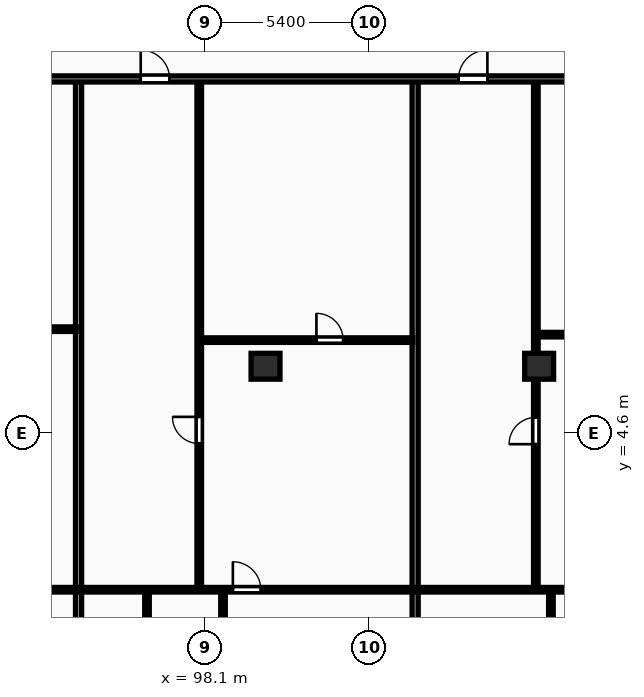
"""IFC4 building model, lengths in metres.
Left out: names, types, materials, properties, quantities, classifications, styles, units other than length and angle.
Written with IfcOpenShell. Run it as: python <this file> out.ifc"""

import sys

from ifc_helpers import new_model, si_unit, direction, frame, frame_2d, origin, origin_2d, place, context, subcontext, project, spatial, rectangle, extrude, element, fill, save


model = new_model("IFC4")
c1 = context("Model", 3, precision=1e-05, world=origin(), true_north=direction((0.0, 1.0)))
c2 = subcontext(c1, "Body", "Model", "MODEL_VIEW")
j1 = project(units=[si_unit("LENGTHUNIT", "METRE"), si_unit("PLANEANGLEUNIT", "RADIAN")], contexts=[c1])
p1 = place(None, origin())
s1 = spatial("IfcSite", under=j1, at=p1, CompositionType="ELEMENT")
p2 = place(p1, origin())
s2 = spatial("IfcBuilding", under=s1, at=p2, CompositionType="ELEMENT")
p3 = place(p2, frame((0.0, 0.0, 24.0)))
s3 = spatial("IfcBuildingStorey", under=s2, at=p3, CompositionType="ELEMENT", Elevation=24.0)
for number, where, z_axis, x_axis in (
    (1, (100.1, 6.8, 0.0), (0.0, 0.0, 1.0), (1.0, 0.0, 0.0)),
    (2, (109.1, 6.8, 0.0), (0.0, 0.0, 1.0), (1.0, 0.0, 0.0)),
):
    element("IfcColumn", number, at=place(p3, frame(where, z_axis=z_axis, x_axis=x_axis)), inside=s3, PredefinedType="COLUMN", context=c2, shape_type="SweptSolid", body=[
        extrude(rectangle(XDim=0.95, YDim=0.85, at=origin_2d()), origin(), (0.0, 0.0, 1.0), 3.25),
    ])
p4 = place(p3, frame((93.95, -10.9, 0.0), z_axis=(0.0, 0.0, 1.0), x_axis=(0.0, 1.0, 0.0)))
e3 = element("IfcWall", 3, at=p4, inside=s3, PredefinedType="PARTITIONING", context=c2, shape_type="SweptSolid", body=[
    extrude(rectangle(XDim=27.07, YDim=0.2, at=frame_2d((13.535, 0.0))), origin(), (0.0, 0.0, 1.0), 2.97),
])
p5 = place(p3, frame((85.802, 8.02, 0.0), z_axis=(0.0, 0.0, 1.0), x_axis=(1.0, 0.0, 0.0)))
e4 = element("IfcWall", 4, at=p5, inside=s3, PredefinedType="PARTITIONING", context=c2, shape_type="SweptSolid", body=[
    extrude(rectangle(XDim=8.069, YDim=0.15, at=frame_2d((4.034, 0.0))), origin(), (0.0, 0.0, 1.0), 2.97),
])
p6 = place(p5, frame((2.716, 0.0, 0.0)))
e5 = element("IfcOpeningElement", 5, at=p6, cuts=e4, PredefinedType="OPENING", context=c2, shape_type="SweptSolid", body=[
    extrude(rectangle(XDim=0.88, YDim=2.06, at=frame_2d((0.44, 1.03))), frame((0.0, 0.085, 0.0), z_axis=(0.0, -1.0, 0.0), x_axis=(1.0, 0.0, 0.0)), (0.0, 0.0, 1.0), 0.17),
])
p7 = place(p3, frame((81.851, -0.55, 0.0), z_axis=(0.0, 0.0, 1.0), x_axis=(1.0, 0.0, 0.0)))
e6 = element("IfcWall", 6, at=p7, inside=s3, PredefinedType="PARTITIONING", context=c2, shape_type="SweptSolid", body=[
    extrude(rectangle(XDim=12.019, YDim=0.15, at=frame_2d((6.009, 0.0))), origin(), (0.0, 0.0, 1.0), 2.97),
])
p8 = place(p7, frame((5.999, 0.0, 0.0)))
e7 = element("IfcOpeningElement", 7, at=p8, cuts=e6, PredefinedType="OPENING", context=c2, shape_type="SweptSolid", body=[
    extrude(rectangle(XDim=0.92, YDim=2.08, at=frame_2d((0.46, 1.04))), frame((0.0, 0.085, 0.0), z_axis=(0.0, -1.0, 0.0), x_axis=(1.0, 0.0, 0.0)), (0.0, 0.0, 1.0), 0.17),
])
p9 = place(p3, frame((105.021, -10.9, 0.0), z_axis=(0.0, 0.0, 1.0), x_axis=(0.0, 1.0, 0.0)))
e8 = element("IfcWall", 8, at=p9, inside=s3, PredefinedType="PARTITIONING", context=c2, shape_type="SweptSolid", body=[
    extrude(rectangle(XDim=27.07, YDim=0.2, at=frame_2d((13.535, 0.0))), origin(), (0.0, 0.0, 1.0), 2.97),
])
p10 = place(p3, frame((97.98, 7.66, 0.0), z_axis=(0.0, 0.0, 1.0), x_axis=(1.0, 0.0, 0.0)))
e9 = element("IfcWall", 9, at=p10, inside=s3, PredefinedType="PARTITIONING", context=c2, shape_type="SweptSolid", body=[
    extrude(rectangle(XDim=6.961, YDim=0.15, at=frame_2d((3.481, 0.0))), origin(), (0.0, 0.0, 1.0), 2.97),
])
p11 = place(p10, frame((3.794, 0.0, 0.0)))
e10 = element("IfcOpeningElement", 10, at=p11, cuts=e9, PredefinedType="OPENING", context=c2, shape_type="SweptSolid", body=[
    extrude(rectangle(XDim=0.88, YDim=2.06, at=frame_2d((0.44, 1.03))), frame((0.0, 0.085, 0.0), z_axis=(0.0, -1.0, 0.0), x_axis=(1.0, 0.0, 0.0)), (0.0, 0.0, 1.0), 0.17),
])
p12 = place(p3, frame((97.92, -0.51, 0.0), z_axis=(0.0, 0.0, 1.0), x_axis=(0.0, 1.0, 0.0)))
e11 = element("IfcWall", 11, at=p12, inside=s3, PredefinedType="PARTITIONING", context=c2, shape_type="SweptSolid", body=[
    extrude(rectangle(XDim=16.7, YDim=0.15, at=frame_2d((8.35, 0.0))), origin(), (0.0, 0.0, 1.0), 2.97),
])
p13 = place(p12, frame((4.765, 0.0, 0.0)))
e12 = element("IfcOpeningElement", 12, at=p13, cuts=e11, PredefinedType="OPENING", context=c2, shape_type="SweptSolid", body=[
    extrude(rectangle(XDim=0.88, YDim=2.06, at=frame_2d((0.44, 1.03))), frame((0.0, 0.085, 0.0), z_axis=(0.0, -1.0, 0.0), x_axis=(1.0, 0.0, 0.0)), (0.0, 0.0, 1.0), 0.17),
])
p14 = place(p3, frame((96.201, -5.59, 0.0), z_axis=(0.0, 0.0, 1.0), x_axis=(0.0, 1.0, 0.0)))
e13 = element("IfcWall", 13, at=p14, inside=s3, PredefinedType="PARTITIONING", context=c2, shape_type="SweptSolid", body=[
    extrude(rectangle(XDim=5.0, YDim=0.15, at=frame_2d((2.5, 0.0))), origin(), (0.0, 0.0, 1.0), 2.97),
])
p15 = place(p14, frame((2.08, 0.0, 0.0)))
e14 = element("IfcOpeningElement", 14, at=p15, cuts=e13, PredefinedType="OPENING", context=c2, shape_type="SweptSolid", body=[
    extrude(rectangle(XDim=0.84, YDim=2.04, at=frame_2d((0.42, 1.02))), frame((0.0, 0.085, 0.0), z_axis=(0.0, -1.0, 0.0), x_axis=(1.0, 0.0, 0.0)), (0.0, 0.0, 1.0), 0.17),
])
p16 = place(p3, frame((98.701, -5.59, 0.0), z_axis=(0.0, 0.0, 1.0), x_axis=(0.0, 1.0, 0.0)))
e15 = element("IfcWall", 15, at=p16, inside=s3, PredefinedType="PARTITIONING", context=c2, shape_type="SweptSolid", body=[
    extrude(rectangle(XDim=5.0, YDim=0.15, at=frame_2d((2.5, 0.0))), origin(), (0.0, 0.0, 1.0), 2.97),
])
p17 = place(p16, frame((3.088, 0.0, 0.0)))
e16 = element("IfcOpeningElement", 16, at=p17, cuts=e15, PredefinedType="OPENING", context=c2, shape_type="SweptSolid", body=[
    extrude(rectangle(XDim=0.84, YDim=2.04, at=frame_2d((0.42, 1.02))), frame((0.0, 0.085, 0.0), z_axis=(0.0, -1.0, 0.0), x_axis=(1.0, 0.0, 0.0)), (0.0, 0.0, 1.0), 0.17),
])
p18 = place(p3, frame((94.03, -0.55, 0.0), z_axis=(0.0, 0.0, 1.0), x_axis=(1.0, 0.0, 0.0)))
e17 = element("IfcWall", 17, at=p18, inside=s3, PredefinedType="PARTITIONING", context=c2, shape_type="SweptSolid", body=[
    extrude(rectangle(XDim=10.911, YDim=0.15, at=frame_2d((5.456, 0.0))), origin(), (0.0, 0.0, 1.0), 2.97),
])
p19 = place(p18, frame((4.996, 0.0, 0.0)))
e18 = element("IfcOpeningElement", 18, at=p19, cuts=e17, PredefinedType="OPENING", context=c2, shape_type="SweptSolid", body=[
    extrude(rectangle(XDim=0.92, YDim=2.08, at=frame_2d((0.46, 1.04))), frame((0.0, 0.085, 0.0), z_axis=(0.0, -1.0, 0.0), x_axis=(1.0, 0.0, 0.0)), (0.0, 0.0, 1.0), 0.17),
])
p20 = place(p3, frame((109.052, 7.84, 0.0), z_axis=(0.0, 0.0, 1.0), x_axis=(1.0, 0.0, 0.0)))
e19 = element("IfcWall", 19, at=p20, inside=s3, PredefinedType="PARTITIONING", context=c2, shape_type="SweptSolid", body=[
    extrude(rectangle(XDim=9.176, YDim=0.15, at=frame_2d((4.588, 0.0))), origin(), (0.0, 0.0, 1.0), 2.97),
])
p21 = place(p20, frame((3.307, 0.0, 0.0)))
e20 = element("IfcOpeningElement", 20, at=p21, cuts=e19, PredefinedType="OPENING", context=c2, shape_type="SweptSolid", body=[
    extrude(rectangle(XDim=0.88, YDim=2.06, at=frame_2d((0.44, 1.03))), frame((0.0, 0.085, 0.0), z_axis=(0.0, -1.0, 0.0), x_axis=(1.0, 0.0, 0.0)), (0.0, 0.0, 1.0), 0.17),
])
p22 = place(p3, frame((108.991, -0.51, 0.0), z_axis=(0.0, 0.0, 1.0), x_axis=(0.0, 1.0, 0.0)))
e21 = element("IfcWall", 21, at=p22, inside=s3, PredefinedType="PARTITIONING", context=c2, shape_type="SweptSolid", body=[
    extrude(rectangle(XDim=16.7, YDim=0.15, at=frame_2d((8.35, 0.0))), origin(), (0.0, 0.0, 1.0), 2.22),
])
p23 = place(p22, frame((4.747, 0.0, 0.0)))
e22 = element("IfcOpeningElement", 22, at=p23, cuts=e21, PredefinedType="OPENING", context=c2, shape_type="SweptSolid", body=[
    extrude(rectangle(XDim=0.88, YDim=2.06, at=frame_2d((0.44, 1.03))), frame((0.0, 0.085, 0.0), z_axis=(0.0, -1.0, 0.0), x_axis=(1.0, 0.0, 0.0)), (0.0, 0.0, 1.0), 0.17),
])
p24 = place(p3, frame((109.487, -5.59, 0.0), z_axis=(0.0, 0.0, 1.0), x_axis=(0.0, 1.0, 0.0)))
e23 = element("IfcWall", 23, at=p24, inside=s3, PredefinedType="PARTITIONING", context=c2, shape_type="SweptSolid", body=[
    extrude(rectangle(XDim=5.0, YDim=0.15, at=frame_2d((2.5, 0.0))), origin(), (0.0, 0.0, 1.0), 2.22),
])
p25 = place(p24, frame((3.049, 0.0, 0.0)))
e24 = element("IfcOpeningElement", 24, at=p25, cuts=e23, PredefinedType="OPENING", context=c2, shape_type="SweptSolid", body=[
    extrude(rectangle(XDim=0.84, YDim=2.04, at=frame_2d((0.42, 1.02))), frame((0.0, 0.085, 0.0), z_axis=(0.0, -1.0, 0.0), x_axis=(1.0, 0.0, 0.0)), (0.0, 0.0, 1.0), 0.17),
])
p26 = place(p3, frame((105.101, -0.55, 0.0), z_axis=(0.0, 0.0, 1.0), x_axis=(1.0, 0.0, 0.0)))
e25 = element("IfcWall", 25, at=p26, inside=s3, PredefinedType="PARTITIONING", context=c2, shape_type="SweptSolid", body=[
    extrude(rectangle(XDim=13.126, YDim=0.15, at=frame_2d((6.563, 0.0))), origin(), (0.0, 0.0, 1.0), 2.97),
])
p27 = place(p26, frame((7.106, 0.0, 0.0)))
e26 = element("IfcOpeningElement", 26, at=p27, cuts=e25, PredefinedType="OPENING", context=c2, shape_type="SweptSolid", body=[
    extrude(rectangle(XDim=0.92, YDim=2.08, at=frame_2d((0.46, 1.04))), frame((0.0, 0.085, 0.0), z_axis=(0.0, -1.0, 0.0), x_axis=(1.0, 0.0, 0.0)), (0.0, 0.0, 1.0), 0.17),
])
p28 = place(p3, frame((70.7, 16.25, 0.0), z_axis=(0.0, 0.0, 1.0), x_axis=(1.0, 0.0, 0.0)))
e27 = element("IfcWall", 27, at=p28, inside=s3, PredefinedType="PARTITIONING", context=c2, shape_type="SweptSolid", body=[
    extrude(rectangle(XDim=62.0, YDim=0.2, at=frame_2d((31.0, 0.0))), origin(), (0.0, 0.0, 1.0), 2.97),
])
p29 = place(p28, frame((1.186, 0.0, 0.0)))
e28 = element("IfcOpeningElement", 28, at=p29, cuts=e27, PredefinedType="OPENING", context=c2, shape_type="SweptSolid", body=[
    extrude(rectangle(XDim=0.95, YDim=2.15, at=frame_2d((0.475, 1.075))), frame((0.0, 0.11, 0.0), z_axis=(0.0, -1.0, 0.0), x_axis=(1.0, 0.0, 0.0)), (0.0, 0.0, 1.0), 0.22),
])
p30 = place(p28, frame((13.116, 0.0, 0.0)))
e29 = element("IfcOpeningElement", 29, at=p30, cuts=e27, PredefinedType="OPENING", context=c2, shape_type="SweptSolid", body=[
    extrude(rectangle(XDim=0.95, YDim=2.15, at=frame_2d((0.475, 1.075))), frame((0.0, 0.11, 0.0), z_axis=(0.0, -1.0, 0.0), x_axis=(1.0, 0.0, 0.0)), (0.0, 0.0, 1.0), 0.22),
])
p31 = place(p28, frame((25.295, 0.0, 0.0)))
e30 = element("IfcOpeningElement", 30, at=p31, cuts=e27, PredefinedType="OPENING", context=c2, shape_type="SweptSolid", body=[
    extrude(rectangle(XDim=0.95, YDim=2.15, at=frame_2d((0.475, 1.075))), frame((0.0, 0.11, 0.0), z_axis=(0.0, -1.0, 0.0), x_axis=(1.0, 0.0, 0.0)), (0.0, 0.0, 1.0), 0.22),
])
p32 = place(p28, frame((35.747, 0.0, 0.0)))
e31 = element("IfcOpeningElement", 31, at=p32, cuts=e27, PredefinedType="OPENING", context=c2, shape_type="SweptSolid", body=[
    extrude(rectangle(XDim=0.95, YDim=2.15, at=frame_2d((0.475, 1.075))), frame((0.0, 0.11, 0.0), z_axis=(0.0, -1.0, 0.0), x_axis=(1.0, 0.0, 0.0)), (0.0, 0.0, 1.0), 0.22),
])
p33 = place(p28, frame((49.652, 0.0, 0.0)))
e32 = element("IfcOpeningElement", 32, at=p33, cuts=e27, PredefinedType="OPENING", context=c2, shape_type="SweptSolid", body=[
    extrude(rectangle(XDim=0.95, YDim=2.15, at=frame_2d((0.475, 1.075))), frame((0.0, 0.11, 0.0), z_axis=(0.0, -1.0, 0.0), x_axis=(1.0, 0.0, 0.0)), (0.0, 0.0, 1.0), 0.22),
])
p34 = place(p11, origin())
e33 = element("IfcDoor", 33, at=p34, inside=s3, OperationType="SINGLE_SWING_LEFT", PredefinedType="DOOR", context=c2, shape_type="SweptSolid", body=[
    extrude(rectangle(XDim=0.88, YDim=2.06, at=frame_2d((0.44, 1.03))), frame((0.0, 0.025, 0.0), z_axis=(0.0, -1.0, 0.0), x_axis=(1.0, 0.0, 0.0)), (0.0, 0.0, 1.0), 0.05),
])
fill(e10, e33)
p35 = place(p13, origin())
e34 = element("IfcDoor", 34, at=p35, inside=s3, OperationType="SINGLE_SWING_RIGHT", PredefinedType="DOOR", context=c2, shape_type="SweptSolid", body=[
    extrude(rectangle(XDim=0.88, YDim=2.06, at=frame_2d((0.44, 1.03))), frame((0.0, 0.025, 0.0), z_axis=(0.0, -1.0, 0.0), x_axis=(1.0, 0.0, 0.0)), (0.0, 0.0, 1.0), 0.05),
])
fill(e12, e34)
p36 = place(p19, origin())
e35 = element("IfcDoor", 35, at=p36, inside=s3, OperationType="SINGLE_SWING_LEFT", PredefinedType="DOOR", context=c2, shape_type="SweptSolid", body=[
    extrude(rectangle(XDim=0.92, YDim=2.08, at=frame_2d((0.46, 1.04))), frame((0.0, 0.025, 0.0), z_axis=(0.0, -1.0, 0.0), x_axis=(1.0, 0.0, 0.0)), (0.0, 0.0, 1.0), 0.05),
])
fill(e18, e35)
p37 = place(p23, origin())
e36 = element("IfcDoor", 36, at=p37, inside=s3, OperationType="SINGLE_SWING_LEFT", PredefinedType="DOOR", context=c2, shape_type="SweptSolid", body=[
    extrude(rectangle(XDim=0.88, YDim=2.06, at=frame_2d((0.44, 1.03))), frame((0.0, 0.025, 0.0), z_axis=(0.0, -1.0, 0.0), x_axis=(1.0, 0.0, 0.0)), (0.0, 0.0, 1.0), 0.05),
])
fill(e22, e36)
p38 = place(p31, origin())
e37 = element("IfcDoor", 37, at=p38, inside=s3, OperationType="SINGLE_SWING_LEFT", PredefinedType="DOOR", context=c2, shape_type="SweptSolid", body=[
    extrude(rectangle(XDim=0.95, YDim=2.15, at=frame_2d((0.475, 1.075))), frame((0.0, 0.025, 0.0), z_axis=(0.0, -1.0, 0.0), x_axis=(1.0, 0.0, 0.0)), (0.0, 0.0, 1.0), 0.05),
])
fill(e30, e37)
p39 = place(p32, origin())
e38 = element("IfcDoor", 38, at=p39, inside=s3, OperationType="SINGLE_SWING_RIGHT", PredefinedType="DOOR", context=c2, shape_type="SweptSolid", body=[
    extrude(rectangle(XDim=0.95, YDim=2.15, at=frame_2d((0.475, 1.075))), frame((0.0, 0.025, 0.0), z_axis=(0.0, -1.0, 0.0), x_axis=(1.0, 0.0, 0.0)), (0.0, 0.0, 1.0), 0.05),
])
fill(e31, e38)
save(model, sys.argv[1])
